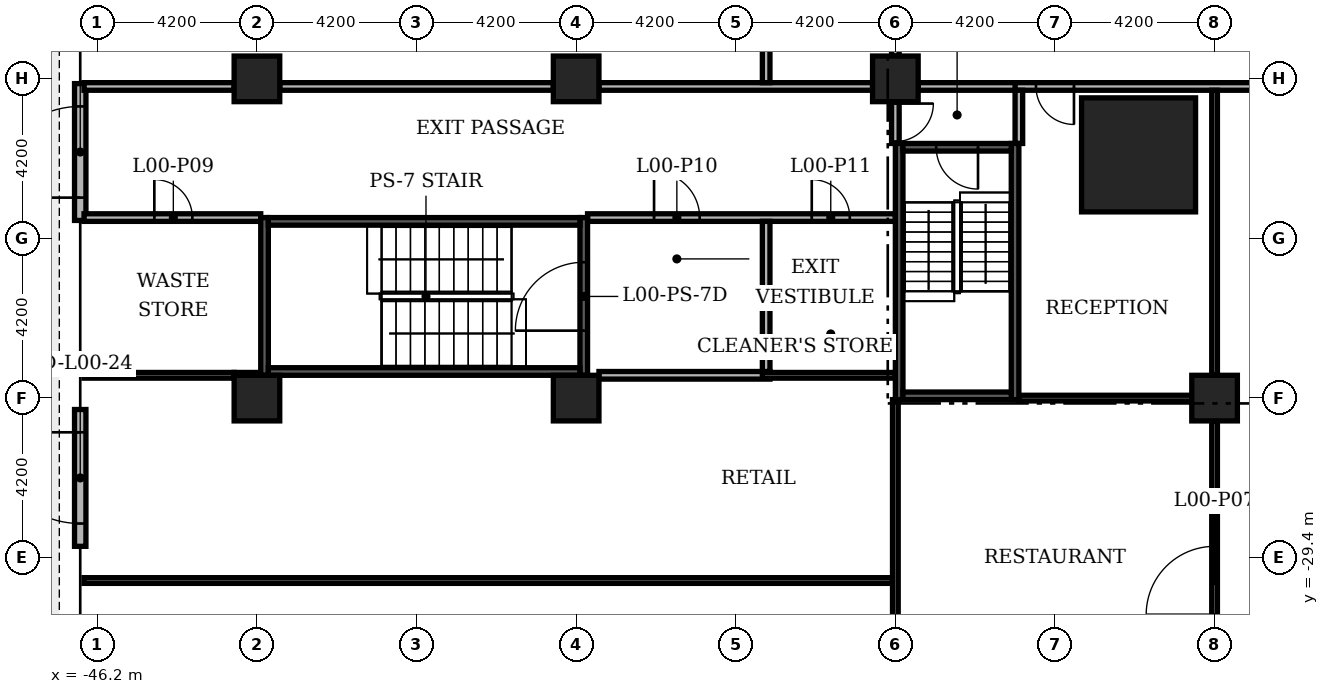
"""IFC4 building model, lengths in metres.
Left out: names, types, materials, properties, quantities, classifications, styles, units other than length and angle.
Written with IfcOpenShell. Run it as: python <this file> out.ifc"""

import sys

from ifc_helpers import new_model, si_unit, direction, frame, frame_2d, origin, origin_2d, place, context, subcontext, project, spatial, rectangle, extrude, element, fill, save


model = new_model("IFC4")
c1 = context("Model", 3, precision=1e-05, world=origin(), true_north=direction((0.0, 1.0)))
c2 = subcontext(c1, "Body", "Model", "MODEL_VIEW")
j1 = project(units=[si_unit("LENGTHUNIT", "METRE"), si_unit("PLANEANGLEUNIT", "RADIAN")], contexts=[c1])
p1 = place(None, origin())
s1 = spatial("IfcSite", under=j1, at=p1, CompositionType="ELEMENT")
p2 = place(p1, origin())
s2 = spatial("IfcBuilding", under=s1, at=p2, CompositionType="ELEMENT")
p3 = place(p2, origin())
s3 = spatial("IfcBuildingStorey", under=s2, at=p3, CompositionType="ELEMENT", Elevation=0.0)
p4 = place(p3, frame((-18.8, -18.8, 0.0), z_axis=(0.0, 0.0, 1.0), x_axis=(1.0, 0.0, 0.0)))
e1 = element("IfcColumn", 1, at=p4, inside=s3, PredefinedType="COLUMN", context=c2, shape_type="SweptSolid", body=[
    extrude(rectangle(XDim=3.0, YDim=3.0, at=origin_2d()), origin(), (0.0, 0.0, 1.0), 7.2),
])
for number, where, z_axis, x_axis in (
    (2, (-16.8, -25.2, 0.0), (0.0, 0.0, 1.0), (1.0, 0.0, 0.0)),
    (3, (-25.2, -16.8, 0.0), (0.0, 0.0, 1.0), (1.0, 0.0, 0.0)),
    (4, (-33.6, -16.8, 0.0), (0.0, 0.0, 1.0), (1.0, 0.0, 0.0)),
    (5, (-33.6, -25.2, 0.0), (0.0, 0.0, 1.0), (1.0, 0.0, 0.0)),
    (6, (-42.0, -16.8, 0.0), (0.0, 0.0, 1.0), (1.0, 0.0, 0.0)),
    (7, (-42.0, -25.2, 0.0), (0.0, 0.0, 1.0), (1.0, 0.0, 0.0)),
):
    element("IfcColumn", number, at=place(p3, frame(where, z_axis=z_axis, x_axis=x_axis)), inside=s3, PredefinedType="COLUMN", context=c2, shape_type="SweptSolid", body=[
        extrude(rectangle(XDim=1.2, YDim=1.2, at=origin_2d()), origin(), (0.0, 0.0, 1.0), 7.2),
    ])
p5 = place(p3, frame((-46.65, -16.925, 0.0), z_axis=(0.0, 0.0, 1.0), x_axis=(0.0, -1.0, 0.0)))
e8 = element("IfcWall", 8, at=p5, inside=s3, PredefinedType="STANDARD", context=c2, shape_type="SweptSolid", body=[
    extrude(rectangle(XDim=3.6, YDim=0.3, at=frame_2d((1.8, 0.0))), origin(), (0.0, 0.0, 1.0), 6.78),
])
p6 = place(p5, frame((0.6, 0.0, 0.0)))
e9 = element("IfcOpeningElement", 9, at=p6, cuts=e8, PredefinedType="OPENING", context=c2, shape_type="SweptSolid", body=[
    extrude(rectangle(XDim=2.4, YDim=2.4, at=frame_2d((1.2, 1.2))), frame((0.0, 0.16, 0.0), z_axis=(0.0, -1.0, 0.0), x_axis=(1.0, 0.0, 0.0)), (0.0, 0.0, 1.0), 0.32),
])
p7 = place(p3, frame((-46.65, -25.5, 0.0), z_axis=(0.0, 0.0, 1.0), x_axis=(0.0, -1.0, 0.0)))
e10 = element("IfcWall", 10, at=p7, inside=s3, PredefinedType="STANDARD", context=c2, shape_type="SweptSolid", body=[
    extrude(rectangle(XDim=3.6, YDim=0.3, at=frame_2d((1.8, 0.0))), origin(), (0.0, 0.0, 1.0), 6.78),
])
p8 = place(p7, frame((0.6, 0.0, 0.0)))
e11 = element("IfcOpeningElement", 11, at=p8, cuts=e10, PredefinedType="OPENING", context=c2, shape_type="SweptSolid", body=[
    extrude(rectangle(XDim=2.4, YDim=2.4, at=frame_2d((1.2, 1.2))), frame((0.0, 0.16, 0.0), z_axis=(0.0, -1.0, 0.0), x_axis=(1.0, 0.0, 0.0)), (0.0, 0.0, 1.0), 0.32),
])
p9 = place(p3, frame((-46.55, -30.0, 0.0), z_axis=(0.0, 0.0, 1.0), x_axis=(1.0, 0.0, 0.0)))
e12 = element("IfcWall", 12, at=p9, inside=s3, PredefinedType="PARTITIONING", context=c2, shape_type="SweptSolid", body=[
    extrude(rectangle(XDim=21.275, YDim=0.15, at=frame_2d((10.638, 0.0))), origin(), (0.0, 0.0, 1.0), 6.38),
])
p10 = place(p3, frame((-21.95, -25.2, 0.0), z_axis=(0.0, 0.0, 1.0), x_axis=(1.0, 0.0, 0.0)))
e13 = element("IfcWall", 13, at=p10, inside=s3, PredefinedType="PARTITIONING", context=c2, shape_type="SweptSolid", body=[
    extrude(rectangle(XDim=4.55, YDim=0.15, at=frame_2d((2.275, 0.0))), origin(), (0.0, 0.0, 1.0), 6.48),
])
p11 = place(p3, frame((-46.55, -24.6, 0.0), z_axis=(0.0, 0.0, 1.0), x_axis=(1.0, 0.0, 0.0)))
e14 = element("IfcWall", 14, at=p11, inside=s3, PredefinedType="PARTITIONING", context=c2, shape_type="SweptSolid", body=[
    extrude(rectangle(XDim=3.95, YDim=0.15, at=frame_2d((1.975, 0.0))), origin(), (0.0, 0.0, 1.0), 6.78),
])
p12 = place(p3, frame((-42.6, -24.6, 0.0), z_axis=(0.0, 0.0, 1.0), x_axis=(1.0, 0.0, 0.0)))
e15 = element("IfcWall", 15, at=p12, inside=s3, PredefinedType="PARTITIONING", context=c2, shape_type="SweptSolid", body=[
    extrude(rectangle(XDim=0.7, YDim=0.15, at=frame_2d((0.35, 0.0))), origin(), (0.0, 0.0, 1.0), 6.78),
])
p13 = place(p3, frame((-33.0, -24.6, 0.0), z_axis=(0.0, 0.0, 1.0), x_axis=(1.0, 0.0, 0.0)))
e16 = element("IfcWall", 16, at=p13, inside=s3, PredefinedType="PARTITIONING", context=c2, shape_type="SweptSolid", body=[
    extrude(rectangle(XDim=4.5, YDim=0.2, at=frame_2d((2.25, 0.0))), origin(), (0.0, 0.0, 1.0), 6.78),
])
p14 = place(p3, frame((-28.7, -24.6, 0.0), z_axis=(0.0, 0.0, 1.0), x_axis=(1.0, 0.0, 0.0)))
e17 = element("IfcWall", 17, at=p14, inside=s3, PredefinedType="PARTITIONING", context=c2, shape_type="SweptSolid", body=[
    extrude(rectangle(XDim=3.5, YDim=0.15, at=frame_2d((1.75, 0.0))), origin(), (0.0, 0.0, 1.0), 6.78),
])
p15 = place(p3, frame((-46.55, -20.45, 0.0), z_axis=(0.0, 0.0, 1.0), x_axis=(1.0, 0.0, 0.0)))
e18 = element("IfcWall", 18, at=p15, inside=s3, PredefinedType="PARTITIONING", context=c2, shape_type="SweptSolid", body=[
    extrude(rectangle(XDim=4.65, YDim=0.2, at=frame_2d((2.325, 0.0))), origin(), (0.0, 0.0, 1.0), 6.38),
])
p16 = place(p15, frame((1.85, 0.0, 0.0)))
e19 = element("IfcOpeningElement", 19, at=p16, cuts=e18, PredefinedType="OPENING", context=c2, shape_type="SweptSolid", body=[
    extrude(rectangle(XDim=1.0, YDim=2.1, at=frame_2d((0.5, 1.05))), frame((0.0, 0.11, 0.0), z_axis=(0.0, -1.0, 0.0), x_axis=(1.0, 0.0, 0.0)), (0.0, 0.0, 1.0), 0.22),
])
p17 = place(p3, frame((-33.3, -20.45, 0.0), z_axis=(0.0, 0.0, 1.0), x_axis=(1.0, 0.0, 0.0)))
e20 = element("IfcWall", 20, at=p17, inside=s3, PredefinedType="PARTITIONING", context=c2, shape_type="SweptSolid", body=[
    extrude(rectangle(XDim=8.1, YDim=0.2, at=frame_2d((4.05, 0.0))), origin(), (0.0, 0.0, 1.0), 6.78),
])
p18 = place(p17, frame((1.75, 0.0, 0.0)))
e21 = element("IfcOpeningElement", 21, at=p18, cuts=e20, PredefinedType="OPENING", context=c2, shape_type="SweptSolid", body=[
    extrude(rectangle(XDim=1.2, YDim=2.2, at=frame_2d((0.6, 1.1))), frame((0.0, 0.11, 0.0), z_axis=(0.0, -1.0, 0.0), x_axis=(1.0, 0.0, 0.0)), (0.0, 0.0, 1.0), 0.22),
])
p19 = place(p17, frame((5.9, 0.0, 0.0)))
e22 = element("IfcOpeningElement", 22, at=p19, cuts=e20, PredefinedType="OPENING", context=c2, shape_type="SweptSolid", body=[
    extrude(rectangle(XDim=1.0, YDim=2.1, at=frame_2d((0.5, 1.05))), frame((0.0, 0.11, 0.0), z_axis=(0.0, -1.0, 0.0), x_axis=(1.0, 0.0, 0.0)), (0.0, 0.0, 1.0), 0.22),
])
p20 = place(p3, frame((-46.55, -17.0, 0.0), z_axis=(0.0, 0.0, 1.0), x_axis=(1.0, 0.0, 0.0)))
e23 = element("IfcWall", 23, at=p20, inside=s3, PredefinedType="PARTITIONING", context=c2, shape_type="SweptSolid", body=[
    extrude(rectangle(XDim=3.95, YDim=0.2, at=frame_2d((1.975, 0.0))), origin(), (0.0, 0.0, 1.0), 6.48),
])
for number, where, z_axis, x_axis in (
    (24, (-41.4, -17.0, 0.0), (0.0, 0.0, 1.0), (1.0, 0.0, 0.0)),
    (25, (-33.0, -17.0, 0.0), (0.0, 0.0, 1.0), (1.0, 0.0, 0.0)),
):
    element("IfcWall", number, at=place(p3, frame(where, z_axis=z_axis, x_axis=x_axis)), inside=s3, PredefinedType="PARTITIONING", context=c2, shape_type="SweptSolid", body=[
        extrude(rectangle(XDim=7.2, YDim=0.2, at=frame_2d((3.6, 0.0))), origin(), (0.0, 0.0, 1.0), 6.48),
    ])
p21 = place(p3, frame((-24.6, -17.0, 0.0), z_axis=(0.0, 0.0, 1.0), x_axis=(1.0, 0.0, 0.0)))
e26 = element("IfcWall", 26, at=p21, inside=s3, PredefinedType="PARTITIONING", context=c2, shape_type="SweptSolid", body=[
    extrude(rectangle(XDim=2.75, YDim=0.2, at=frame_2d((1.375, 0.0))), origin(), (0.0, 0.0, 1.0), 6.78),
])
p22 = place(p3, frame((-22.05, -17.0, 0.0), z_axis=(0.0, 0.0, 1.0), x_axis=(1.0, 0.0, 0.0)))
e27 = element("IfcWall", 27, at=p22, inside=s3, PredefinedType="PARTITIONING", context=c2, shape_type="SweptSolid", body=[
    extrude(rectangle(XDim=44.1, YDim=0.2, at=frame_2d((22.05, 0.0))), origin(), (0.0, 0.0, 1.0), 6.78),
])
p23 = place(p22, frame((0.55, 0.0, 0.0)))
e28 = element("IfcOpeningElement", 28, at=p23, cuts=e27, PredefinedType="OPENING", context=c2, shape_type="SweptSolid", body=[
    extrude(rectangle(XDim=1.0, YDim=2.1, at=frame_2d((0.5, 1.05))), frame((0.0, 0.11, 0.0), z_axis=(0.0, -1.0, 0.0), x_axis=(1.0, 0.0, 0.0)), (0.0, 0.0, 1.0), 0.22),
])
p24 = place(p22, frame((12.85, 0.0, 0.0)))
e29 = element("IfcOpeningElement", 29, at=p24, cuts=e27, PredefinedType="OPENING", context=c2, shape_type="SweptSolid", body=[
    extrude(rectangle(XDim=2.4, YDim=2.4, at=frame_2d((1.2, 1.2))), frame((0.0, 0.11, 0.0), z_axis=(0.0, -1.0, 0.0), x_axis=(1.0, 0.0, 0.0)), (0.0, 0.0, 1.0), 0.22),
])
p25 = place(p22, frame((28.85, 0.0, 0.0)))
e30 = element("IfcOpeningElement", 30, at=p25, cuts=e27, PredefinedType="OPENING", context=c2, shape_type="SweptSolid", body=[
    extrude(rectangle(XDim=2.4, YDim=2.4, at=frame_2d((1.2, 1.2))), frame((0.0, 0.11, 0.0), z_axis=(0.0, -1.0, 0.0), x_axis=(1.0, 0.0, 0.0)), (0.0, 0.0, 1.0), 0.22),
])
p26 = place(p22, frame((42.55, 0.0, 0.0)))
e31 = element("IfcOpeningElement", 31, at=p26, cuts=e27, PredefinedType="OPENING", context=c2, shape_type="SweptSolid", body=[
    extrude(rectangle(XDim=1.0, YDim=2.1, at=frame_2d((0.5, 1.05))), frame((0.0, 0.11, 0.0), z_axis=(0.0, -1.0, 0.0), x_axis=(1.0, 0.0, 0.0)), (0.0, 0.0, 1.0), 0.22),
])
p27 = place(p3, frame((-28.6, -24.5, 0.0), z_axis=(0.0, 0.0, 1.0), x_axis=(0.0, 1.0, 0.0)))
e32 = element("IfcWall", 32, at=p27, inside=s3, PredefinedType="PARTITIONING", context=c2, shape_type="SweptSolid", body=[
    extrude(rectangle(XDim=3.95, YDim=0.2, at=frame_2d((1.975, 0.0))), origin(), (0.0, 0.0, 1.0), 6.78),
])
p28 = place(p3, frame((-28.6, -16.9, 0.0), z_axis=(0.0, 0.0, 1.0), x_axis=(0.0, 1.0, 0.0)))
e33 = element("IfcWall", 33, at=p28, inside=s3, PredefinedType="PARTITIONING", context=c2, shape_type="SweptSolid", body=[
    extrude(rectangle(XDim=33.8, YDim=0.2, at=frame_2d((16.9, 0.0))), origin(), (0.0, 0.0, 1.0), 6.48),
])
p29 = place(p28, frame((3.6, 0.0, 0.0)))
e34 = element("IfcOpeningElement", 34, at=p29, cuts=e33, PredefinedType="OPENING", context=c2, shape_type="SweptSolid", body=[
    extrude(rectangle(XDim=1.2, YDim=2.2, at=frame_2d((0.6, 1.1))), frame((0.0, 0.11, 0.0), z_axis=(0.0, -1.0, 0.0), x_axis=(1.0, 0.0, 0.0)), (0.0, 0.0, 1.0), 0.22),
])
p30 = place(p28, frame((12.1, 0.0, 0.0)))
e35 = element("IfcOpeningElement", 35, at=p30, cuts=e33, PredefinedType="OPENING", context=c2, shape_type="SweptSolid", body=[
    extrude(rectangle(XDim=1.2, YDim=2.2, at=frame_2d((0.6, 1.1))), frame((0.0, 0.11, 0.0), z_axis=(0.0, -1.0, 0.0), x_axis=(1.0, 0.0, 0.0)), (0.0, 0.0, 1.0), 0.22),
])
p31 = place(p28, frame((20.5, 0.0, 0.0)))
e36 = element("IfcOpeningElement", 36, at=p31, cuts=e33, PredefinedType="OPENING", context=c2, shape_type="SweptSolid", body=[
    extrude(rectangle(XDim=1.2, YDim=2.2, at=frame_2d((0.6, 1.1))), frame((0.0, 0.11, 0.0), z_axis=(0.0, -1.0, 0.0), x_axis=(1.0, 0.0, 0.0)), (0.0, 0.0, 1.0), 0.22),
])
p32 = place(p28, frame((29.0, 0.0, 0.0)))
e37 = element("IfcOpeningElement", 37, at=p32, cuts=e33, PredefinedType="OPENING", context=c2, shape_type="SweptSolid", body=[
    extrude(rectangle(XDim=1.2, YDim=2.2, at=frame_2d((0.6, 1.1))), frame((0.0, 0.11, 0.0), z_axis=(0.0, -1.0, 0.0), x_axis=(1.0, 0.0, 0.0)), (0.0, 0.0, 1.0), 0.22),
])
p33 = place(p3, frame((-25.2, -33.0, 0.0), z_axis=(0.0, 0.0, 1.0), x_axis=(0.0, 1.0, 0.0)))
e38 = element("IfcWall", 38, at=p33, inside=s3, PredefinedType="PARTITIONING", context=c2, shape_type="SweptSolid", body=[
    extrude(rectangle(XDim=7.76, YDim=0.15, at=frame_2d((3.88, 0.0))), origin(), (0.0, 0.0, 1.0), 6.38),
])
p34 = place(p3, frame((-25.2, -18.5, 0.0), z_axis=(0.0, 0.0, 1.0), x_axis=(0.0, 1.0, 0.0)))
e39 = element("IfcWall", 39, at=p34, inside=s3, PredefinedType="PARTITIONING", context=c2, shape_type="SweptSolid", body=[
    extrude(rectangle(XDim=1.1, YDim=0.2, at=frame_2d((0.55, 0.0))), origin(), (0.0, 0.0, 1.0), 6.38),
])
p35 = place(p34, frame((0.05, 0.0, 0.0)))
e40 = element("IfcOpeningElement", 40, at=p35, cuts=e39, PredefinedType="OPENING", context=c2, shape_type="SweptSolid", body=[
    extrude(rectangle(XDim=1.0, YDim=2.2, at=frame_2d((0.5, 1.1))), frame((0.0, 0.11, 0.0), z_axis=(0.0, -1.0, 0.0), x_axis=(1.0, 0.0, 0.0)), (0.0, 0.0, 1.0), 0.22),
])
p36 = place(p3, frame((-25.2, -16.2, 0.0), z_axis=(0.0, 0.0, 1.0), x_axis=(0.0, 1.0, 0.0)))
e41 = element("IfcWall", 41, at=p36, inside=s3, PredefinedType="PARTITIONING", context=c2, shape_type="SweptSolid", body=[
    extrude(rectangle(XDim=7.2, YDim=0.2, at=frame_2d((3.6, 0.0))), origin(), (0.0, 0.0, 1.0), 6.48),
])
p37 = place(p36, frame((1.5, 0.0, 0.0)))
e42 = element("IfcOpeningElement", 42, at=p37, cuts=e41, PredefinedType="OPENING", context=c2, shape_type="SweptSolid", body=[
    extrude(rectangle(XDim=1.8, YDim=2.2, at=frame_2d((0.9, 1.1))), frame((0.0, 0.11, 0.0), z_axis=(0.0, -1.0, 0.0), x_axis=(1.0, 0.0, 0.0)), (0.0, 0.0, 1.0), 0.22),
])
p38 = place(p3, frame((-21.95, -18.5, 0.0), z_axis=(0.0, 0.0, 1.0), x_axis=(0.0, 1.0, 0.0)))
e43 = element("IfcWall", 43, at=p38, inside=s3, PredefinedType="PARTITIONING", context=c2, shape_type="SweptSolid", body=[
    extrude(rectangle(XDim=1.4, YDim=0.2, at=frame_2d((0.7, 0.0))), origin(), (0.0, 0.0, 1.0), 6.78),
])
p39 = place(p3, frame((-16.8, -33.0, 0.0), z_axis=(0.0, 0.0, 1.0), x_axis=(0.0, 1.0, 0.0)))
e44 = element("IfcWall", 44, at=p39, inside=s3, PredefinedType="PARTITIONING", context=c2, shape_type="SweptSolid", body=[
    extrude(rectangle(XDim=7.2, YDim=0.15, at=frame_2d((3.6, 0.0))), origin(), (0.0, 0.0, 1.0), 6.38),
])
p40 = place(p39, frame((2.1, 0.0, 0.0)))
e45 = element("IfcOpeningElement", 45, at=p40, cuts=e44, PredefinedType="OPENING", context=c2, shape_type="SweptSolid", body=[
    extrude(rectangle(XDim=1.8, YDim=2.2, at=frame_2d((0.9, 1.1))), frame((0.0, 0.085, 0.0), z_axis=(0.0, -1.0, 0.0), x_axis=(1.0, 0.0, 0.0)), (0.0, 0.0, 1.0), 0.17),
])
p41 = place(p3, frame((-16.8, -24.6, 0.0), z_axis=(0.0, 0.0, 1.0), x_axis=(0.0, 1.0, 0.0)))
e46 = element("IfcWall", 46, at=p41, inside=s3, PredefinedType="PARTITIONING", context=c2, shape_type="SweptSolid", body=[
    extrude(rectangle(XDim=7.5, YDim=0.15, at=frame_2d((3.75, 0.0))), origin(), (0.0, 0.0, 1.0), 6.78),
])
p42 = place(p3, frame((-25.1, -25.24, 0.0), z_axis=(0.0, 0.0, 1.0), x_axis=(0.0, 1.0, 0.0)))
e47 = element("IfcWall", 47, at=p42, inside=s3, PredefinedType="SOLIDWALL", context=c2, shape_type="SweptSolid", body=[
    extrude(rectangle(XDim=6.74, YDim=0.2, at=frame_2d((3.37, 0.0))), origin(), (0.0, 0.0, 1.0), 6.38),
])
p43 = place(p3, frame((-22.05, -25.24, 0.0), z_axis=(0.0, 0.0, 1.0), x_axis=(0.0, 1.0, 0.0)))
e48 = element("IfcWall", 48, at=p43, inside=s3, PredefinedType="SOLIDWALL", context=c2, shape_type="SweptSolid", body=[
    extrude(rectangle(XDim=6.74, YDim=0.2, at=frame_2d((3.37, 0.0))), origin(), (0.0, 0.0, 1.0), 6.78),
])
p44 = place(p3, frame((-25.0, -25.14, 0.0), z_axis=(0.0, 0.0, 1.0), x_axis=(1.0, 0.0, 0.0)))
e49 = element("IfcWall", 49, at=p44, inside=s3, PredefinedType="SOLIDWALL", context=c2, shape_type="SweptSolid", body=[
    extrude(rectangle(XDim=2.85, YDim=0.2, at=frame_2d((1.425, 0.0))), origin(), (0.0, 0.0, 1.0), 6.48),
])
p45 = place(p3, frame((-25.0, -18.6, 0.0), z_axis=(0.0, 0.0, 1.0), x_axis=(1.0, 0.0, 0.0)))
e50 = element("IfcWall", 50, at=p45, inside=s3, PredefinedType="SOLIDWALL", context=c2, shape_type="SweptSolid", body=[
    extrude(rectangle(XDim=2.85, YDim=0.2, at=frame_2d((1.425, 0.0))), origin(), (0.0, 0.0, 1.0), 6.78),
])
p46 = place(p45, frame((0.875, 0.0, 0.0)))
e51 = element("IfcOpeningElement", 51, at=p46, cuts=e50, PredefinedType="OPENING", context=c2, shape_type="SweptSolid", body=[
    extrude(rectangle(XDim=1.1, YDim=2.2, at=frame_2d((0.55, 1.1))), frame((0.0, 0.11, 0.0), z_axis=(0.0, -1.0, 0.0), x_axis=(1.0, 0.0, 0.0)), (0.0, 0.0, 1.0), 0.22),
])
p47 = place(p3, frame((-41.8, -24.6, 0.0), z_axis=(0.0, 0.0, 1.0), x_axis=(0.0, 1.0, 0.0)))
e52 = element("IfcWall", 52, at=p47, inside=s3, PredefinedType="SOLIDWALL", context=c2, shape_type="SweptSolid", body=[
    extrude(rectangle(XDim=4.15, YDim=0.2, at=frame_2d((2.075, 0.0))), origin(), (0.0, 0.0, 1.0), 6.38),
])
p48 = place(p3, frame((-33.4, -24.6, 0.0), z_axis=(0.0, 0.0, 1.0), x_axis=(0.0, 1.0, 0.0)))
e53 = element("IfcWall", 53, at=p48, inside=s3, PredefinedType="SOLIDWALL", context=c2, shape_type="SweptSolid", body=[
    extrude(rectangle(XDim=4.15, YDim=0.2, at=frame_2d((2.075, 0.0))), origin(), (0.0, 0.0, 1.0), 6.38),
])
p49 = place(p48, frame((1.175, 0.0, 0.0)))
e54 = element("IfcOpeningElement", 54, at=p49, cuts=e53, PredefinedType="OPENING", context=c2, shape_type="SweptSolid", body=[
    extrude(rectangle(XDim=1.8, YDim=2.2, at=frame_2d((0.9, 1.1))), frame((0.0, 0.11, 0.0), z_axis=(0.0, -1.0, 0.0), x_axis=(1.0, 0.0, 0.0)), (0.0, 0.0, 1.0), 0.22),
])
for number, where, z_axis, x_axis in (
    (55, (-41.7, -24.5, 0.0), (0.0, 0.0, 1.0), (1.0, 0.0, 0.0)),
    (56, (-41.7, -20.55, 0.0), (0.0, 0.0, 1.0), (1.0, 0.0, 0.0)),
):
    element("IfcWall", number, at=place(p3, frame(where, z_axis=z_axis, x_axis=x_axis)), inside=s3, PredefinedType="SOLIDWALL", context=c2, shape_type="SweptSolid", body=[
        extrude(rectangle(XDim=8.2, YDim=0.2, at=frame_2d((4.1, 0.0))), origin(), (0.0, 0.0, 1.0), 7.0),
    ])
p50 = place(p6, frame((2.4, 0.0, 0.0), z_axis=(0.0, 0.0, 1.0), x_axis=(-1.0, 0.0, 0.0)))
e57 = element("IfcDoor", 57, at=p50, inside=s3, OperationType="SINGLE_SWING_RIGHT", PredefinedType="DOOR", context=c2, shape_type="SweptSolid", body=[
    extrude(rectangle(XDim=2.4, YDim=2.4, at=frame_2d((1.2, 1.2))), frame((0.0, 0.025, 0.0), z_axis=(0.0, -1.0, 0.0), x_axis=(1.0, 0.0, 0.0)), (0.0, 0.0, 1.0), 0.05),
])
fill(e9, e57)
p51 = place(p8, frame((2.4, 0.0, 0.0), z_axis=(0.0, 0.0, 1.0), x_axis=(-1.0, 0.0, 0.0)))
e58 = element("IfcDoor", 58, at=p51, inside=s3, OperationType="DOUBLE_DOOR_SINGLE_SWING", PredefinedType="DOOR", context=c2, shape_type="SweptSolid", body=[
    extrude(rectangle(XDim=2.4, YDim=2.4, at=frame_2d((1.2, 1.2))), frame((0.0, 0.025, 0.0), z_axis=(0.0, -1.0, 0.0), x_axis=(1.0, 0.0, 0.0)), (0.0, 0.0, 1.0), 0.05),
])
fill(e11, e58)
p52 = place(p40, origin())
e59 = element("IfcDoor", 59, at=p52, inside=s3, OperationType="DOUBLE_DOOR_SINGLE_SWING", PredefinedType="DOOR", context=c2, shape_type="SweptSolid", body=[
    extrude(rectangle(XDim=1.8, YDim=2.2, at=frame_2d((0.9, 1.1))), frame((0.0, 0.025, 0.0), z_axis=(0.0, -1.0, 0.0), x_axis=(1.0, 0.0, 0.0)), (0.0, 0.0, 1.0), 0.05),
])
fill(e45, e59)
p53 = place(p16, origin())
e60 = element("IfcDoor", 60, at=p53, inside=s3, OperationType="SINGLE_SWING_LEFT", PredefinedType="DOOR", context=c2, shape_type="SweptSolid", body=[
    extrude(rectangle(XDim=1.0, YDim=2.1, at=frame_2d((0.5, 1.05))), frame((0.0, 0.025, 0.0), z_axis=(0.0, -1.0, 0.0), x_axis=(1.0, 0.0, 0.0)), (0.0, 0.0, 1.0), 0.05),
])
fill(e19, e60)
p54 = place(p18, origin())
e61 = element("IfcDoor", 61, at=p54, inside=s3, OperationType="SINGLE_SWING_LEFT", PredefinedType="DOOR", context=c2, shape_type="SweptSolid", body=[
    extrude(rectangle(XDim=1.2, YDim=2.2, at=frame_2d((0.6, 1.1))), frame((0.0, 0.025, 0.0), z_axis=(0.0, -1.0, 0.0), x_axis=(1.0, 0.0, 0.0)), (0.0, 0.0, 1.0), 0.05),
])
fill(e21, e61)
p55 = place(p19, origin())
e62 = element("IfcDoor", 62, at=p55, inside=s3, OperationType="SINGLE_SWING_LEFT", PredefinedType="DOOR", context=c2, shape_type="SweptSolid", body=[
    extrude(rectangle(XDim=1.0, YDim=2.1, at=frame_2d((0.5, 1.05))), frame((0.0, 0.025, 0.0), z_axis=(0.0, -1.0, 0.0), x_axis=(1.0, 0.0, 0.0)), (0.0, 0.0, 1.0), 0.05),
])
fill(e22, e62)
p56 = place(p35, origin())
e63 = element("IfcDoor", 63, at=p56, inside=s3, OperationType="SINGLE_SWING_RIGHT", PredefinedType="DOOR", context=c2, shape_type="SweptSolid", body=[
    extrude(rectangle(XDim=1.0, YDim=2.2, at=frame_2d((0.5, 1.1))), frame((0.0, 0.025, 0.0), z_axis=(0.0, -1.0, 0.0), x_axis=(1.0, 0.0, 0.0)), (0.0, 0.0, 1.0), 0.05),
])
fill(e40, e63)
p57 = place(p23, origin())
e64 = element("IfcDoor", 64, at=p57, inside=s3, OperationType="SINGLE_SWING_RIGHT", PredefinedType="DOOR", context=c2, shape_type="SweptSolid", body=[
    extrude(rectangle(XDim=1.0, YDim=2.1, at=frame_2d((0.5, 1.05))), frame((0.0, 0.025, 0.0), z_axis=(0.0, -1.0, 0.0), x_axis=(1.0, 0.0, 0.0)), (0.0, 0.0, 1.0), 0.05),
])
fill(e28, e64)
p58 = place(p46, origin())
e65 = element("IfcDoor", 65, at=p58, inside=s3, OperationType="SINGLE_SWING_RIGHT", PredefinedType="DOOR", context=c2, shape_type="SweptSolid", body=[
    extrude(rectangle(XDim=1.1, YDim=2.2, at=frame_2d((0.55, 1.1))), frame((0.0, 0.025, 0.0), z_axis=(0.0, -1.0, 0.0), x_axis=(1.0, 0.0, 0.0)), (0.0, 0.0, 1.0), 0.05),
])
fill(e51, e65)
p59 = place(p49, origin())
e66 = element("IfcDoor", 66, at=p59, inside=s3, OperationType="DOUBLE_DOOR_SINGLE_SWING", PredefinedType="DOOR", context=c2, shape_type="SweptSolid", body=[
    extrude(rectangle(XDim=1.8, YDim=2.2, at=frame_2d((0.9, 1.1))), frame((0.0, 0.025, 0.0), z_axis=(0.0, -1.0, 0.0), x_axis=(1.0, 0.0, 0.0)), (0.0, 0.0, 1.0), 0.05),
])
fill(e54, e66)
save(model, sys.argv[1])
